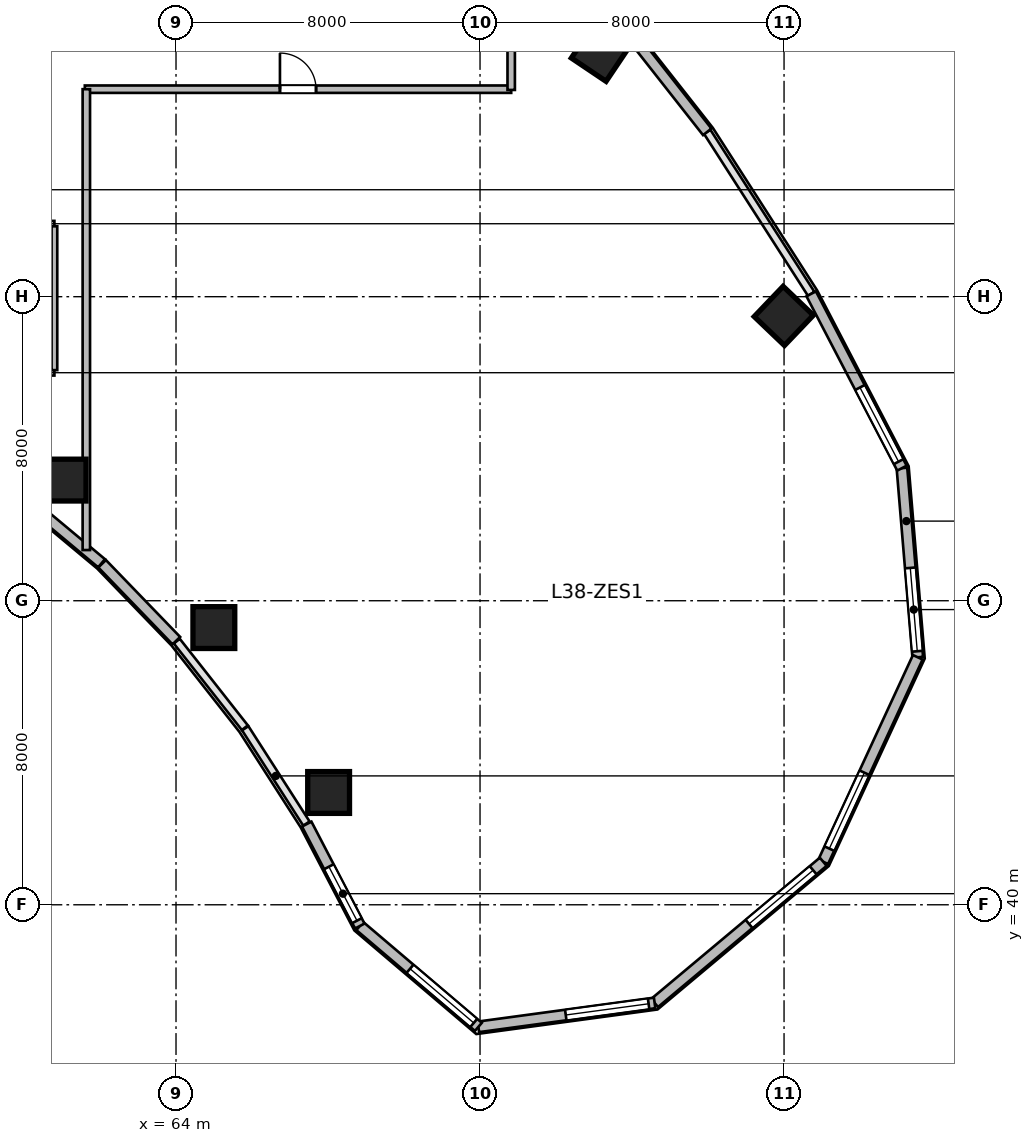
"""IFC4 building model, lengths in metres.
Left out: names, types, materials, properties, quantities, classifications, styles, units other than length and angle.
Written with IfcOpenShell. Run it as: python <this file> out.ifc"""

import sys

from ifc_helpers import new_model, si_unit, direction, frame, frame_2d, origin, origin_2d, place, context, subcontext, project, spatial, rectangle, circle, extrude, source, transform, mapped, element, fill, save


model = new_model("IFC4")
c1 = context("Model", 3, precision=1e-05, world=origin(), true_north=direction((0.0, 1.0)))
c2 = subcontext(c1, "Body", "Model", "MODEL_VIEW")
j1 = project(units=[si_unit("LENGTHUNIT", "METRE"), si_unit("PLANEANGLEUNIT", "RADIAN")], contexts=[c1])
p1 = place(None, origin())
s1 = spatial("IfcSite", under=j1, at=p1, CompositionType="ELEMENT")
p2 = place(p1, origin())
s2 = spatial("IfcBuilding", under=s1, at=p2, CompositionType="ELEMENT")
p3 = place(p2, frame((0.0, 0.0, 158.4)))
s3 = spatial("IfcBuildingStorey", under=s2, at=p3, CompositionType="ELEMENT", Elevation=158.4)
m1 = source(origin(), c2, "Body", "SweptSolid", [
    extrude(circle(Radius=0.55, at=origin_2d()), origin(), (0.0, 0.0, 1.0), 3.9),
])
for number, where, z_axis, x_axis in (
    (1, (61.082, 51.175, 0.0), (0.0, 0.0, 1.0), (0.409, 0.912, 0.0)),
    (2, (64.996, 47.294, 0.0), (0.0, 0.0, 1.0), (0.558, 0.83, 0.0)),
):
    element("IfcColumn", number, at=place(p3, frame(where, z_axis=z_axis, x_axis=x_axis)), inside=s3, PredefinedType="COLUMN", context=c2, shape_type="MappedRepresentation", body=[
        mapped(m1, transform((0.0, 0.0, 0.0), scale=1.0)),
    ])
m2 = source(origin(), c2, "Body", "SweptSolid", [
    extrude(rectangle(XDim=1.1, YDim=1.1, at=origin_2d()), origin(), (0.0, 0.0, 1.0), 3.9),
])
p4 = place(p3, frame((75.167, 62.43, 0.0), z_axis=(0.0, 0.0, 1.0), x_axis=(0.55774510898, 0.830012285095, 0.0)))
e3 = element("IfcColumn", 3, at=p4, inside=s3, PredefinedType="COLUMN", context=c2, shape_type="MappedRepresentation", body=[
    mapped(m2, transform((0.0, 0.0, 0.0), scale=1.0)),
])
p5 = place(p3, frame((68.015, 42.955, 0.0), z_axis=(0.0, 0.0, 1.0), x_axis=(0.690756218984, 0.723087716626, 0.0)))
e4 = element("IfcColumn", 4, at=p5, inside=s3, PredefinedType="COLUMN", context=c2, shape_type="MappedRepresentation", body=[
    mapped(m1, transform((0.0, 0.0, 0.0), scale=1.0)),
])
p6 = place(p3, frame((79.993, 55.494, 0.0), z_axis=(0.0, 0.0, 1.0), x_axis=(0.690756218984, 0.723087716626, 0.0)))
e5 = element("IfcColumn", 5, at=p6, inside=s3, PredefinedType="COLUMN", context=c2, shape_type="MappedRepresentation", body=[
    mapped(m2, transform((0.0, 0.0, 0.0), scale=1.0)),
])
m3 = source(origin(), c2, "Body", "SweptSolid", [
    extrude(rectangle(XDim=4.994, YDim=0.28, at=frame_2d((2.497, 0.0))), origin(), (0.0, 0.0, 1.0), 3.65),
])
p7 = place(p3, frame((83.102, 51.489, 0.0), z_axis=(0.0, 0.0, 1.0), x_axis=(0.083344839916, -0.996520766296, 0.0)))
e6 = element("IfcWall", 6, at=p7, inside=s3, PredefinedType="SOLIDWALL", context=c2, shape_type="MappedRepresentation", body=[
    mapped(m3, transform((0.0, 0.0, 0.0), scale=1.0)),
])
p8 = place(p7, frame((2.635, 0.0, 0.95)))
e7 = element("IfcOpeningElement", 7, at=p8, cuts=e6, PredefinedType="OPENING", context=c2, shape_type="SweptSolid", body=[
    extrude(rectangle(XDim=2.2, YDim=2.1, at=frame_2d((1.1, 1.05))), frame((0.0, 0.15, 0.0), z_axis=(0.0, -1.0, 0.0), x_axis=(1.0, 0.0, 0.0)), (0.0, 0.0, 1.0), 0.3),
])
m4 = source(origin(), c2, "Body", "SweptSolid", [
    extrude(rectangle(XDim=5.927, YDim=0.28, at=frame_2d((2.964, 0.0))), origin(), (0.0, 0.0, 1.0), 3.65),
])
p9 = place(p3, frame((83.519, 46.512, 0.0), z_axis=(0.0, 0.0, 1.0), x_axis=(-0.419656204795, -0.907683132914, 0.0)))
e8 = element("IfcWall", 8, at=p9, inside=s3, PredefinedType="SOLIDWALL", context=c2, shape_type="MappedRepresentation", body=[
    mapped(m4, transform((0.0, 0.0, 0.0), scale=1.0)),
])
p10 = place(p9, frame((3.346, 0.0, 0.95)))
e9 = element("IfcOpeningElement", 9, at=p10, cuts=e8, PredefinedType="OPENING", context=c2, shape_type="SweptSolid", body=[
    extrude(rectangle(XDim=2.2, YDim=2.1, at=frame_2d((1.1, 1.05))), frame((0.0, 0.15, 0.0), z_axis=(0.0, -1.0, 0.0), x_axis=(1.0, 0.0, 0.0)), (0.0, 0.0, 1.0), 0.3),
])
m5 = source(origin(), c2, "Body", "SweptSolid", [
    extrude(rectangle(XDim=5.786, YDim=0.28, at=frame_2d((2.893, 0.0))), origin(), (0.0, 0.0, 1.0), 3.65),
])
p11 = place(p3, frame((81.031, 41.131, 0.0), z_axis=(0.0, 0.0, 1.0), x_axis=(-0.766711306852, -0.641992034176, 0.0)))
e10 = element("IfcWall", 10, at=p11, inside=s3, PredefinedType="SOLIDWALL", context=c2, shape_type="MappedRepresentation", body=[
    mapped(m5, transform((0.0, 0.0, 0.0), scale=1.0)),
])
p12 = place(p11, frame((0.347, 0.0, 0.95)))
e11 = element("IfcOpeningElement", 11, at=p12, cuts=e10, PredefinedType="OPENING", context=c2, shape_type="SweptSolid", body=[
    extrude(rectangle(XDim=2.2, YDim=2.1, at=frame_2d((1.1, 1.05))), frame((0.0, 0.15, 0.0), z_axis=(0.0, -1.0, 0.0), x_axis=(1.0, 0.0, 0.0)), (0.0, 0.0, 1.0), 0.3),
])
m6 = source(origin(), c2, "Body", "SweptSolid", [
    extrude(rectangle(XDim=4.68, YDim=0.28, at=frame_2d((2.34, 0.0))), origin(), (0.0, 0.0, 1.0), 3.65),
])
p13 = place(p3, frame((76.594, 37.417, 0.0), z_axis=(0.0, 0.0, 1.0), x_axis=(-0.990931146435, -0.134370618162, 0.0)))
e12 = element("IfcWall", 12, at=p13, inside=s3, PredefinedType="SOLIDWALL", context=c2, shape_type="MappedRepresentation", body=[
    mapped(m6, transform((0.0, 0.0, 0.0), scale=1.0)),
])
p14 = place(p13, frame((0.16, 0.0, 0.95)))
e13 = element("IfcOpeningElement", 13, at=p14, cuts=e12, PredefinedType="OPENING", context=c2, shape_type="SweptSolid", body=[
    extrude(rectangle(XDim=2.2, YDim=2.1, at=frame_2d((1.1, 1.05))), frame((0.0, 0.15, 0.0), z_axis=(0.0, -1.0, 0.0), x_axis=(1.0, 0.0, 0.0)), (0.0, 0.0, 1.0), 0.3),
])
m7 = source(origin(), c2, "Body", "SweptSolid", [
    extrude(rectangle(XDim=4.096, YDim=0.28, at=frame_2d((2.048, 0.0))), origin(), (0.0, 0.0, 1.0), 3.65),
])
p15 = place(p3, frame((71.957, 36.788, 0.0), z_axis=(0.0, 0.0, 1.0), x_axis=(-0.761926081737, 0.647663991564, 0.0)))
e14 = element("IfcWall", 14, at=p15, inside=s3, PredefinedType="SOLIDWALL", context=c2, shape_type="MappedRepresentation", body=[
    mapped(m7, transform((0.0, 0.0, 0.0), scale=1.0)),
])
p16 = place(p15, frame((0.16, 0.0, 0.95)))
e15 = element("IfcOpeningElement", 15, at=p16, cuts=e14, PredefinedType="OPENING", context=c2, shape_type="SweptSolid", body=[
    extrude(rectangle(XDim=2.2, YDim=2.1, at=frame_2d((1.1, 1.05))), frame((0.0, 0.15, 0.0), z_axis=(0.0, -1.0, 0.0), x_axis=(1.0, 0.0, 0.0)), (0.0, 0.0, 1.0), 0.3),
])
m8 = source(origin(), c2, "Body", "SweptSolid", [
    extrude(rectangle(XDim=3.024, YDim=0.28, at=frame_2d((1.512, 0.0))), origin(), (0.0, 0.0, 1.0), 3.65),
])
p17 = place(p3, frame((68.836, 39.44, 0.0), z_axis=(0.0, 0.0, 1.0), x_axis=(-0.461718746531, 0.887026380161, 0.0)))
e16 = element("IfcWall", 16, at=p17, inside=s3, PredefinedType="SOLIDWALL", context=c2, shape_type="MappedRepresentation", body=[
    mapped(m8, transform((0.0, 0.0, 0.0), scale=1.0)),
])
p18 = place(p17, frame((0.16, 0.0, 0.95)))
e17 = element("IfcOpeningElement", 17, at=p18, cuts=e16, PredefinedType="OPENING", context=c2, shape_type="SweptSolid", body=[
    extrude(rectangle(XDim=1.6, YDim=1.9, at=frame_2d((0.8, 0.95))), frame((0.0, 0.15, 0.0), z_axis=(0.0, -1.0, 0.0), x_axis=(1.0, 0.0, 0.0)), (0.0, 0.0, 1.0), 0.3),
])
m9 = source(origin(), c2, "Body", "SweptSolid", [
    extrude(rectangle(XDim=2.812, YDim=0.28, at=frame_2d((1.406, 0.0))), origin(), (0.0, 0.0, 1.0), 3.65),
])
p19 = place(p3, frame((64.008, 46.95, 0.0), z_axis=(0.0, 0.0, 1.0), x_axis=(-0.694583668785, 0.719411931411, 0.0)))
e18 = element("IfcWall", 18, at=p19, inside=s3, PredefinedType="SOLIDWALL", context=c2, shape_type="MappedRepresentation", body=[
    mapped(m9, transform((0.0, 0.0, 0.0), scale=1.0)),
])
m10 = source(origin(), c2, "Body", "SweptSolid", [
    extrude(rectangle(XDim=2.729, YDim=0.28, at=frame_2d((1.365, 0.0))), origin(), (0.0, 0.0, 1.0), 3.65),
])
p20 = place(p3, frame((62.041, 48.987, 0.0), z_axis=(0.0, 0.0, 1.0), x_axis=(-0.767957284255, 0.640501061326, 0.0)))
e19 = element("IfcWall", 19, at=p20, inside=s3, PredefinedType="SOLIDWALL", context=c2, shape_type="MappedRepresentation", body=[
    mapped(m10, transform((0.0, 0.0, 0.0), scale=1.0)),
])
m11 = source(origin(), c2, "Body", "SweptSolid", [
    extrude(rectangle(XDim=4.922, YDim=0.28, at=frame_2d((2.461, 0.0))), origin(), (0.0, 0.0, 1.0), 3.65),
])
p21 = place(p3, frame((74.936, 64.206, 0.0), z_axis=(0.0, 0.0, 1.0), x_axis=(0.61817639101, -0.786039407153, 0.0)))
e20 = element("IfcWall", 20, at=p21, inside=s3, PredefinedType="SOLIDWALL", context=c2, shape_type="MappedRepresentation", body=[
    mapped(m11, transform((0.0, 0.0, 0.0), scale=1.0)),
])
m12 = source(origin(), c2, "Body", "SweptSolid", [
    extrude(rectangle(XDim=5.171, YDim=0.28, at=frame_2d((2.585, 0.0))), origin(), (0.0, 0.0, 1.0), 3.65),
])
p22 = place(p3, frame((80.715, 56.075, 0.0), z_axis=(0.0, 0.0, 1.0), x_axis=(0.461752581363, -0.887008767491, 0.0)))
e21 = element("IfcWall", 21, at=p22, inside=s3, PredefinedType="SOLIDWALL", context=c2, shape_type="MappedRepresentation", body=[
    mapped(m12, transform((0.0, 0.0, 0.0), scale=1.0)),
])
p23 = place(p22, frame((2.778, 0.0, 0.95)))
e22 = element("IfcOpeningElement", 22, at=p23, cuts=e21, PredefinedType="OPENING", context=c2, shape_type="SweptSolid", body=[
    extrude(rectangle(XDim=2.2, YDim=2.1, at=frame_2d((1.1, 1.05))), frame((0.0, 0.15, 0.0), z_axis=(0.0, -1.0, 0.0), x_axis=(1.0, 0.0, 0.0)), (0.0, 0.0, 1.0), 0.3),
])
m13 = source(origin(), c2, "Body", "SweptSolid", [
    extrude(rectangle(XDim=6.6, YDim=0.15, at=frame_2d((3.3, 0.0))), origin(), (0.0, 0.0, 1.0), 3.095),
])
p24 = place(p3, frame((54.2, 54.0, 0.0), z_axis=(0.0, 0.0, 1.0), x_axis=(1.0, 0.0, 0.0)))
e23 = element("IfcWall", 23, at=p24, inside=s3, PredefinedType="PARTITIONING", context=c2, shape_type="MappedRepresentation", body=[
    mapped(m13, transform((0.0, 0.0, 0.0), scale=1.0)),
])
m14 = source(origin(), c2, "Body", "SweptSolid", [
    extrude(rectangle(XDim=6.6, YDim=0.15, at=frame_2d((3.3, 0.0))), origin(), (0.0, 0.0, 1.0), 3.65),
])
p25 = place(p3, frame((54.2, 57.92, 0.0), z_axis=(0.0, 0.0, 1.0), x_axis=(1.0, 0.0, 0.0)))
e24 = element("IfcWall", 24, at=p25, inside=s3, PredefinedType="PARTITIONING", context=c2, shape_type="MappedRepresentation", body=[
    mapped(m14, transform((0.0, 0.0, 0.0), scale=1.0)),
])
p26 = place(p25, frame((2.825, 0.0, 0.0)))
e25 = element("IfcOpeningElement", 25, at=p26, cuts=e24, PredefinedType="OPENING", context=c2, shape_type="SweptSolid", body=[
    extrude(rectangle(XDim=0.95, YDim=2.1, at=frame_2d((0.475, 1.05))), frame((0.0, 0.085, 0.0), z_axis=(0.0, -1.0, 0.0), x_axis=(1.0, 0.0, 0.0)), (0.0, 0.0, 1.0), 0.17),
])
m15 = source(origin(), c2, "Body", "SweptSolid", [
    extrude(rectangle(XDim=3.785, YDim=0.15, at=frame_2d((1.893, 0.0))), origin(), (0.0, 0.0, 1.0), 3.65),
])
p27 = place(p3, frame((60.8, 54.067, 0.0), z_axis=(0.0, 0.0, 1.0), x_axis=(0.0, 1.0, 0.0)))
e26 = element("IfcWall", 26, at=p27, inside=s3, PredefinedType="PARTITIONING", context=c2, shape_type="MappedRepresentation", body=[
    mapped(m15, transform((0.0, 0.0, 0.0), scale=1.0)),
])
m16 = source(origin(), c2, "Body", "SweptSolid", [
    extrude(rectangle(XDim=11.22, YDim=0.195, at=frame_2d((5.61, 0.0))), origin(), (0.0, 0.0, 1.0), 3.65),
])
p28 = place(p3, frame((61.6, 61.46, 0.0), z_axis=(0.0, 0.0, 1.0), x_axis=(1.0, 0.0, 0.0)))
e27 = element("IfcWall", 27, at=p28, inside=s3, PredefinedType="PARTITIONING", context=c2, shape_type="MappedRepresentation", body=[
    mapped(m16, transform((0.0, 0.0, 0.0), scale=1.0)),
])
p29 = place(p28, frame((5.135, 0.0, 0.0)))
e28 = element("IfcOpeningElement", 28, at=p29, cuts=e27, PredefinedType="OPENING", context=c2, shape_type="SweptSolid", body=[
    extrude(rectangle(XDim=0.95, YDim=2.1, at=frame_2d((0.475, 1.05))), frame((0.0, 0.107, 0.0), z_axis=(0.0, -1.0, 0.0), x_axis=(1.0, 0.0, 0.0)), (0.0, 0.0, 1.0), 0.215),
])
m17 = source(origin(), c2, "Body", "SweptSolid", [
    extrude(rectangle(XDim=12.126, YDim=0.195, at=frame_2d((6.063, 0.0))), origin(), (0.0, 0.0, 1.0), 2.942),
])
p30 = place(p3, frame((61.64, 49.334, 0.0), z_axis=(0.0, 0.0, 1.0), x_axis=(0.0, 1.0, 0.0)))
e29 = element("IfcWall", 29, at=p30, inside=s3, PredefinedType="PARTITIONING", context=c2, shape_type="MappedRepresentation", body=[
    mapped(m17, transform((0.0, 0.0, 0.0), scale=1.0)),
])
m18 = source(origin(), c2, "Body", "SweptSolid", [
    extrude(rectangle(XDim=2.62, YDim=0.195, at=frame_2d((1.31, 0.0))), origin(), (0.0, 0.0, 1.0), 3.022),
])
p31 = place(p3, frame((72.82, 61.44, 0.0), z_axis=(0.0, 0.0, 1.0), x_axis=(0.0, 1.0, 0.0)))
e30 = element("IfcWall", 30, at=p31, inside=s3, PredefinedType="PARTITIONING", context=c2, shape_type="MappedRepresentation", body=[
    mapped(m18, transform((0.0, 0.0, 0.0), scale=1.0)),
])
m19 = source(origin(), c2, "Body", "SweptSolid", [
    extrude(rectangle(XDim=2.2, YDim=2.1, at=frame_2d((1.1, 1.05))), frame((0.0, 0.03, 0.0), z_axis=(0.0, -1.0, 0.0), x_axis=(1.0, 0.0, 0.0)), (0.0, 0.0, 1.0), 0.06),
])
p32 = place(p8, origin())
e31 = element("IfcWindow", 31, at=p32, inside=s3, PartitioningType="TRIPLE_PANEL_VERTICAL", PredefinedType="WINDOW", context=c2, shape_type="MappedRepresentation", body=[
    mapped(m19, transform((0.0, 0.0, 0.0), scale=1.0)),
])
fill(e7, e31)
p33 = place(p10, origin())
e32 = element("IfcWindow", 32, at=p33, inside=s3, PartitioningType="TRIPLE_PANEL_VERTICAL", PredefinedType="WINDOW", context=c2, shape_type="MappedRepresentation", body=[
    mapped(m19, transform((0.0, 0.0, 0.0), scale=1.0)),
])
fill(e9, e32)
p34 = place(p12, origin())
e33 = element("IfcWindow", 33, at=p34, inside=s3, PartitioningType="TRIPLE_PANEL_VERTICAL", PredefinedType="WINDOW", context=c2, shape_type="MappedRepresentation", body=[
    mapped(m19, transform((0.0, 0.0, 0.0), scale=1.0)),
])
fill(e11, e33)
p35 = place(p14, origin())
e34 = element("IfcWindow", 34, at=p35, inside=s3, PartitioningType="TRIPLE_PANEL_VERTICAL", PredefinedType="WINDOW", context=c2, shape_type="MappedRepresentation", body=[
    mapped(m19, transform((0.0, 0.0, 0.0), scale=1.0)),
])
fill(e13, e34)
p36 = place(p16, origin())
e35 = element("IfcWindow", 35, at=p36, inside=s3, PartitioningType="TRIPLE_PANEL_VERTICAL", PredefinedType="WINDOW", context=c2, shape_type="MappedRepresentation", body=[
    mapped(m19, transform((0.0, 0.0, 0.0), scale=1.0)),
])
fill(e15, e35)
m20 = source(origin(), c2, "Body", "SweptSolid", [
    extrude(rectangle(XDim=1.6, YDim=1.9, at=frame_2d((0.8, 0.95))), frame((0.0, 0.03, 0.0), z_axis=(0.0, -1.0, 0.0), x_axis=(1.0, 0.0, 0.0)), (0.0, 0.0, 1.0), 0.06),
])
p37 = place(p18, origin())
e36 = element("IfcWindow", 36, at=p37, inside=s3, PartitioningType="SINGLE_PANEL", PredefinedType="WINDOW", context=c2, shape_type="MappedRepresentation", body=[
    mapped(m20, transform((0.0, 0.0, 0.0), scale=1.0)),
])
fill(e17, e36)
p38 = place(p23, origin())
e37 = element("IfcWindow", 37, at=p38, inside=s3, PartitioningType="TRIPLE_PANEL_VERTICAL", PredefinedType="WINDOW", context=c2, shape_type="MappedRepresentation", body=[
    mapped(m19, transform((0.0, 0.0, 0.0), scale=1.0)),
])
fill(e22, e37)
m21 = source(origin(), c2, "Body", "SweptSolid", [
    extrude(rectangle(XDim=0.95, YDim=2.1, at=frame_2d((0.475, 1.05))), frame((0.0, 0.025, 0.0), z_axis=(0.0, -1.0, 0.0), x_axis=(1.0, 0.0, 0.0)), (0.0, 0.0, 1.0), 0.05),
])
p39 = place(p29, origin())
e38 = element("IfcDoor", 38, at=p39, inside=s3, OperationType="SINGLE_SWING_LEFT", PredefinedType="DOOR", context=c2, shape_type="MappedRepresentation", body=[
    mapped(m21, transform((0.0, 0.0, 0.0), scale=1.0)),
])
fill(e28, e38)
save(model, sys.argv[1])
